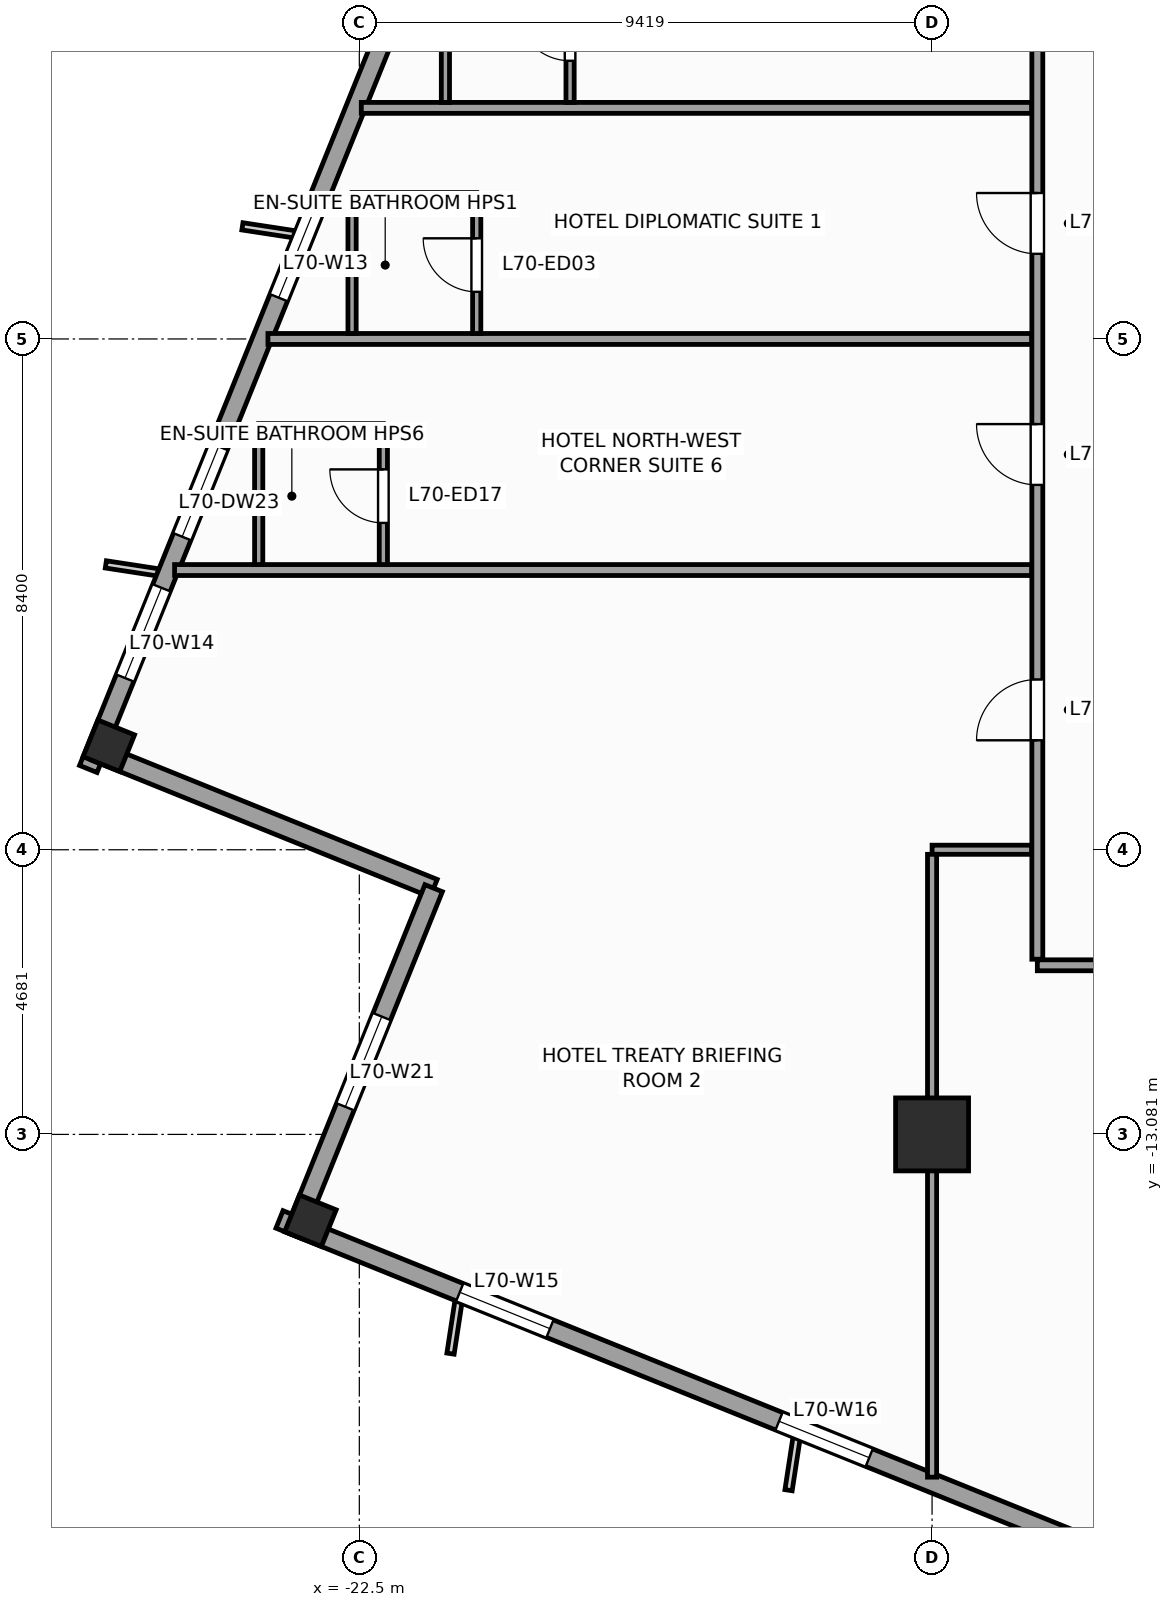
"""IFC4 building model, lengths in metres.
Left out: names, types, materials, properties, quantities, classifications, styles, units other than length and angle.
Written with IfcOpenShell. Run it as: python <this file> out.ifc"""

import sys

from ifc_helpers import new_model, si_unit, direction, frame, frame_2d, origin, origin_2d, place, context, subcontext, project, spatial, rectangle, extrude, source, transform, mapped, element, fill, save


model = new_model("IFC4")
c1 = context("Model", 3, precision=1e-05, world=origin(), true_north=direction((0.0, 1.0)))
c2 = subcontext(c1, "Body", "Model", "MODEL_VIEW")
j1 = project(units=[si_unit("LENGTHUNIT", "METRE"), si_unit("PLANEANGLEUNIT", "RADIAN")], contexts=[c1])
p1 = place(None, origin())
s1 = spatial("IfcSite", under=j1, at=p1, CompositionType="ELEMENT")
p2 = place(p1, origin())
s2 = spatial("IfcBuilding", under=s1, at=p2, CompositionType="ELEMENT")
p3 = place(p2, frame((0.0, 0.0, 286.8)))
s3 = spatial("IfcBuildingStorey", under=s2, at=p3, CompositionType="ELEMENT", Elevation=286.8)
m1 = source(origin(), c2, "Body", "SweptSolid", [
    extrude(rectangle(XDim=1.2, YDim=1.2, at=origin_2d()), origin(), (0.0, 0.0, 1.0), 3.6),
])
p4 = place(p3, frame((-13.081, -13.081, 0.0), z_axis=(0.0, 0.0, 1.0), x_axis=(1.0, 0.0, 0.0)))
e1 = element("IfcColumn", 1, at=p4, inside=s3, PredefinedType="COLUMN", context=c2, shape_type="MappedRepresentation", body=[
    mapped(m1, transform((0.0, 0.0, 0.0), scale=1.0)),
])
m2 = source(origin(), c2, "Body", "SweptSolid", [
    extrude(rectangle(XDim=0.65, YDim=0.65, at=origin_2d()), origin(), (0.0, 0.0, 1.0), 3.6),
])
for number, where, z_axis, x_axis in (
    (2, (-26.62, -6.69, 0.0), (0.0, 0.0, 1.0), (0.375, 0.927, 0.0)),
    (3, (-23.304, -14.501, 0.0), (0.0, 0.0, 1.0), (0.375, 0.927, 0.0)),
):
    element("IfcColumn", number, at=place(p3, frame(where, z_axis=z_axis, x_axis=x_axis)), inside=s3, PredefinedType="COLUMN", context=c2, shape_type="MappedRepresentation", body=[
        mapped(m2, transform((0.0, 0.0, 0.0), scale=1.0)),
    ])
p5 = place(p3, frame((-14.479, 23.813, 0.0), z_axis=(0.0, 0.0, 1.0), x_axis=(-0.374609557019, -0.927182657188, 0.0)))
e4 = element("IfcWall", 4, at=p5, inside=s3, PredefinedType="STANDARD", context=c2, shape_type="SweptSolid", body=[
    extrude(rectangle(XDim=33.31, YDim=0.31, at=frame_2d((16.655, 0.0))), origin(), (0.0, 0.0, 1.0), 2.75),
])
p6 = place(p5, frame((3.197, 0.0, 0.47)))
e5 = element("IfcOpeningElement", 5, at=p6, cuts=e4, PredefinedType="OPENING", context=c2, shape_type="SweptSolid", body=[
    extrude(rectangle(XDim=1.6, YDim=2.1, at=frame_2d((0.8, 1.05))), frame((0.0, 0.165, 0.0), z_axis=(0.0, -1.0, 0.0), x_axis=(1.0, 0.0, 0.0)), (0.0, 0.0, 1.0), 0.33),
])
p7 = place(p5, frame((8.86, 0.0, 0.47)))
e6 = element("IfcOpeningElement", 6, at=p7, cuts=e4, PredefinedType="OPENING", context=c2, shape_type="SweptSolid", body=[
    extrude(rectangle(XDim=1.6, YDim=2.1, at=frame_2d((0.8, 1.05))), frame((0.0, 0.165, 0.0), z_axis=(0.0, -1.0, 0.0), x_axis=(1.0, 0.0, 0.0)), (0.0, 0.0, 1.0), 0.33),
])
p8 = place(p5, frame((14.439, 0.0, 0.47)))
e7 = element("IfcOpeningElement", 7, at=p8, cuts=e4, PredefinedType="OPENING", context=c2, shape_type="SweptSolid", body=[
    extrude(rectangle(XDim=1.6, YDim=2.1, at=frame_2d((0.8, 1.05))), frame((0.0, 0.165, 0.0), z_axis=(0.0, -1.0, 0.0), x_axis=(1.0, 0.0, 0.0)), (0.0, 0.0, 1.0), 0.33),
])
p9 = place(p5, frame((23.351, 0.0, 0.47)))
e8 = element("IfcOpeningElement", 8, at=p9, cuts=e4, PredefinedType="OPENING", context=c2, shape_type="SweptSolid", body=[
    extrude(rectangle(XDim=1.6, YDim=2.1, at=frame_2d((0.8, 1.05))), frame((0.0, 0.165, 0.0), z_axis=(0.0, -1.0, 0.0), x_axis=(1.0, 0.0, 0.0)), (0.0, 0.0, 1.0), 0.33),
])
p10 = place(p5, frame((30.097, 0.0, 0.47)))
e9 = element("IfcOpeningElement", 9, at=p10, cuts=e4, PredefinedType="OPENING", context=c2, shape_type="SweptSolid", body=[
    extrude(rectangle(XDim=1.6, YDim=2.1, at=frame_2d((0.8, 1.05))), frame((0.0, 0.165, 0.0), z_axis=(0.0, -1.0, 0.0), x_axis=(1.0, 0.0, 0.0)), (0.0, 0.0, 1.0), 0.33),
])
p11 = place(p5, frame((27.59, 0.0, 0.47)))
e10 = element("IfcOpeningElement", 10, at=p11, cuts=e4, PredefinedType="OPENING", context=c2, shape_type="SweptSolid", body=[
    extrude(rectangle(XDim=1.6, YDim=2.1, at=frame_2d((0.8, 1.05))), frame((0.0, 0.165, 0.0), z_axis=(0.0, -1.0, 0.0), x_axis=(1.0, 0.0, 0.0)), (0.0, 0.0, 1.0), 0.33),
])
p12 = place(p3, frame((-26.841, -6.784, 0.0), z_axis=(0.0, 0.0, 1.0), x_axis=(0.927171722085, -0.374636620962, 0.0)))
e11 = element("IfcWall", 11, at=p12, inside=s3, PredefinedType="STANDARD", context=c2, shape_type="SweptSolid", body=[
    extrude(rectangle(XDim=6.0, YDim=0.31, at=frame_2d((3.0, 0.0))), origin(), (0.0, 0.0, 1.0), 2.65),
])
p13 = place(p3, frame((-21.278, -9.032, 0.0), z_axis=(0.0, 0.0, 1.0), x_axis=(-0.374602739196, -0.927185411764, 0.0)))
e12 = element("IfcWall", 12, at=p13, inside=s3, PredefinedType="STANDARD", context=c2, shape_type="SweptSolid", body=[
    extrude(rectangle(XDim=6.155, YDim=0.31, at=frame_2d((3.078, 0.0))), origin(), (0.0, 0.0, 1.0), 3.35),
])
p14 = place(p13, frame((2.278, 0.0, 0.47)))
e13 = element("IfcOpeningElement", 13, at=p14, cuts=e12, PredefinedType="OPENING", context=c2, shape_type="SweptSolid", body=[
    extrude(rectangle(XDim=1.6, YDim=2.1, at=frame_2d((0.8, 1.05))), frame((0.0, 0.165, 0.0), z_axis=(0.0, -1.0, 0.0), x_axis=(1.0, 0.0, 0.0)), (0.0, 0.0, 1.0), 0.33),
])
p15 = place(p3, frame((-23.813, -14.479, 0.0), z_axis=(0.0, 0.0, 1.0), x_axis=(0.927182657188, -0.374609557019, 0.0)))
e14 = element("IfcWall", 14, at=p15, inside=s3, PredefinedType="STANDARD", context=c2, shape_type="SweptSolid", body=[
    extrude(rectangle(XDim=33.31, YDim=0.31, at=frame_2d((16.655, 0.0))), origin(), (0.0, 0.0, 1.0), 2.75),
])
p16 = place(p15, frame((21.73, 0.0, 0.0)))
e15 = element("IfcOpeningElement", 15, at=p16, cuts=e14, PredefinedType="OPENING", context=c2, shape_type="SweptSolid", body=[
    extrude(rectangle(XDim=1.05, YDim=2.25, at=frame_2d((0.525, 1.125))), frame((0.0, 0.165, 0.0), z_axis=(0.0, -1.0, 0.0), x_axis=(1.0, 0.0, 0.0)), (0.0, 0.0, 1.0), 0.33),
])
p17 = place(p15, frame((3.197, 0.0, 0.47)))
e16 = element("IfcOpeningElement", 16, at=p17, cuts=e14, PredefinedType="OPENING", context=c2, shape_type="SweptSolid", body=[
    extrude(rectangle(XDim=1.6, YDim=2.1, at=frame_2d((0.8, 1.05))), frame((0.0, 0.165, 0.0), z_axis=(0.0, -1.0, 0.0), x_axis=(1.0, 0.0, 0.0)), (0.0, 0.0, 1.0), 0.33),
])
p18 = place(p15, frame((8.86, 0.0, 0.47)))
e17 = element("IfcOpeningElement", 17, at=p18, cuts=e14, PredefinedType="OPENING", context=c2, shape_type="SweptSolid", body=[
    extrude(rectangle(XDim=1.6, YDim=2.1, at=frame_2d((0.8, 1.05))), frame((0.0, 0.165, 0.0), z_axis=(0.0, -1.0, 0.0), x_axis=(1.0, 0.0, 0.0)), (0.0, 0.0, 1.0), 0.33),
])
p19 = place(p15, frame((14.439, 0.0, 0.47)))
e18 = element("IfcOpeningElement", 18, at=p19, cuts=e14, PredefinedType="OPENING", context=c2, shape_type="SweptSolid", body=[
    extrude(rectangle(XDim=1.6, YDim=2.1, at=frame_2d((0.8, 1.05))), frame((0.0, 0.165, 0.0), z_axis=(0.0, -1.0, 0.0), x_axis=(1.0, 0.0, 0.0)), (0.0, 0.0, 1.0), 0.33),
])
p20 = place(p15, frame((27.847, 0.0, 0.47)))
e19 = element("IfcOpeningElement", 19, at=p20, cuts=e14, PredefinedType="OPENING", context=c2, shape_type="SweptSolid", body=[
    extrude(rectangle(XDim=1.6, YDim=2.1, at=frame_2d((0.8, 1.05))), frame((0.0, 0.165, 0.0), z_axis=(0.0, -1.0, 0.0), x_axis=(1.0, 0.0, 0.0)), (0.0, 0.0, 1.0), 0.33),
])
p21 = place(p3, frame((-11.35, -10.3, 0.0), z_axis=(0.0, 0.0, 1.0), x_axis=(1.0, 0.0, 0.0)))
e20 = element("IfcWall", 20, at=p21, inside=s3, PredefinedType="PARTITIONING", context=c2, shape_type="SweptSolid", body=[
    extrude(rectangle(XDim=22.8, YDim=0.18, at=frame_2d((11.4, 0.0))), origin(), (0.0, 0.0, 1.0), 3.35),
])
p22 = place(p21, frame((12.336, 0.0, 0.0)))
e21 = element("IfcOpeningElement", 21, at=p22, cuts=e20, PredefinedType="OPENING", context=c2, shape_type="SweptSolid", body=[
    extrude(rectangle(XDim=0.95, YDim=2.1, at=frame_2d((0.475, 1.05))), frame((0.0, 0.1, 0.0), z_axis=(0.0, -1.0, 0.0), x_axis=(1.0, 0.0, 0.0)), (0.0, 0.0, 1.0), 0.2),
])
p23 = place(p21, frame((17.71, 0.0, 0.0)))
e22 = element("IfcOpeningElement", 22, at=p23, cuts=e20, PredefinedType="OPENING", context=c2, shape_type="SweptSolid", body=[
    extrude(rectangle(XDim=1.0, YDim=2.15, at=frame_2d((0.5, 1.075))), frame((0.0, 0.1, 0.0), z_axis=(0.0, -1.0, 0.0), x_axis=(1.0, 0.0, 0.0)), (0.0, 0.0, 1.0), 0.2),
])
p24 = place(p21, frame((5.339, 0.0, 0.0)))
e23 = element("IfcOpeningElement", 23, at=p24, cuts=e20, PredefinedType="OPENING", context=c2, shape_type="SweptSolid", body=[
    extrude(rectangle(XDim=1.0, YDim=2.15, at=frame_2d((0.5, 1.075))), frame((0.0, 0.1, 0.0), z_axis=(0.0, -1.0, 0.0), x_axis=(1.0, 0.0, 0.0)), (0.0, 0.0, 1.0), 0.2),
])
p25 = place(p3, frame((-11.35, -10.2, 0.0), z_axis=(0.0, 0.0, 1.0), x_axis=(0.0, 1.0, 0.0)))
e24 = element("IfcWall", 24, at=p25, inside=s3, PredefinedType="PARTITIONING", context=c2, shape_type="SweptSolid", body=[
    extrude(rectangle(XDim=22.55, YDim=0.18, at=frame_2d((11.275, 0.0))), origin(), (0.0, 0.0, 1.0), 3.35),
])
p26 = place(p25, frame((11.6, 0.0, 0.0)))
e25 = element("IfcOpeningElement", 25, at=p26, cuts=e24, PredefinedType="OPENING", context=c2, shape_type="SweptSolid", body=[
    extrude(rectangle(XDim=1.0, YDim=2.15, at=frame_2d((0.5, 1.075))), frame((0.0, 0.1, 0.0), z_axis=(0.0, -1.0, 0.0), x_axis=(1.0, 0.0, 0.0)), (0.0, 0.0, 1.0), 0.2),
])
p27 = place(p25, frame((15.8, 0.0, 0.0)))
e26 = element("IfcOpeningElement", 26, at=p27, cuts=e24, PredefinedType="OPENING", context=c2, shape_type="SweptSolid", body=[
    extrude(rectangle(XDim=1.0, YDim=2.15, at=frame_2d((0.5, 1.075))), frame((0.0, 0.1, 0.0), z_axis=(0.0, -1.0, 0.0), x_axis=(1.0, 0.0, 0.0)), (0.0, 0.0, 1.0), 0.2),
])
p28 = place(p25, frame((3.6, 0.0, 0.0)))
e27 = element("IfcOpeningElement", 27, at=p28, cuts=e24, PredefinedType="OPENING", context=c2, shape_type="SweptSolid", body=[
    extrude(rectangle(XDim=1.0, YDim=2.15, at=frame_2d((0.5, 1.075))), frame((0.0, 0.1, 0.0), z_axis=(0.0, -1.0, 0.0), x_axis=(1.0, 0.0, 0.0)), (0.0, 0.0, 1.0), 0.2),
])
p29 = place(p25, frame((7.8, 0.0, 0.0)))
e28 = element("IfcOpeningElement", 28, at=p29, cuts=e24, PredefinedType="OPENING", context=c2, shape_type="SweptSolid", body=[
    extrude(rectangle(XDim=1.0, YDim=2.15, at=frame_2d((0.5, 1.075))), frame((0.0, 0.1, 0.0), z_axis=(0.0, -1.0, 0.0), x_axis=(1.0, 0.0, 0.0)), (0.0, 0.0, 1.0), 0.2),
])
p30 = place(p3, frame((-11.445, -3.8, 0.0), z_axis=(0.0, 0.0, 1.0), x_axis=(-1.0, 0.0, 0.0)))
e29 = element("IfcWall", 29, at=p30, inside=s3, PredefinedType="PARTITIONING", context=c2, shape_type="SweptSolid", body=[
    extrude(rectangle(XDim=14.093, YDim=0.18, at=frame_2d((7.046, 0.0))), origin(), (0.0, 0.0, 1.0), 3.35),
])
p31 = place(p3, frame((-11.445, 0.0, 0.0), z_axis=(0.0, 0.0, 1.0), x_axis=(-1.0, 0.0, 0.0)))
e30 = element("IfcWall", 30, at=p31, inside=s3, PredefinedType="PARTITIONING", context=c2, shape_type="SweptSolid", body=[
    extrude(rectangle(XDim=12.558, YDim=0.18, at=frame_2d((6.279, 0.0))), origin(), (0.0, 0.0, 1.0), 3.02),
])
p32 = place(p3, frame((-11.445, 3.8, 0.0), z_axis=(0.0, 0.0, 1.0), x_axis=(-1.0, 0.0, 0.0)))
e31 = element("IfcWall", 31, at=p32, inside=s3, PredefinedType="PARTITIONING", context=c2, shape_type="SweptSolid", body=[
    extrude(rectangle(XDim=11.022, YDim=0.18, at=frame_2d((5.511, 0.0))), origin(), (0.0, 0.0, 1.0), 3.02),
])
p33 = place(p3, frame((-11.445, -8.4, 0.0), z_axis=(0.0, 0.0, 1.0), x_axis=(-1.0, 0.0, 0.0)))
e32 = element("IfcWall", 32, at=p33, inside=s3, PredefinedType="PARTITIONING", context=c2, shape_type="SweptSolid", body=[
    extrude(rectangle(XDim=1.636, YDim=0.15, at=frame_2d((0.818, 0.0))), origin(), (0.0, 0.0, 1.0), 3.35),
])
p34 = place(p3, frame((-13.081, -8.475, 0.0), z_axis=(0.0, 0.0, 1.0), x_axis=(0.0, -1.0, 0.0)))
e33 = element("IfcWall", 33, at=p34, inside=s3, PredefinedType="PARTITIONING", context=c2, shape_type="SweptSolid", body=[
    extrude(rectangle(XDim=10.243, YDim=0.15, at=frame_2d((5.121, 0.0))), origin(), (0.0, 0.0, 1.0), 2.45),
])
p35 = place(p3, frame((-20.57, 0.09, 0.0), z_axis=(0.0, 0.0, 1.0), x_axis=(0.0, 1.0, 0.0)))
e34 = element("IfcWall", 34, at=p35, inside=s3, PredefinedType="PARTITIONING", context=c2, shape_type="SweptSolid", body=[
    extrude(rectangle(XDim=2.25, YDim=0.135, at=frame_2d((1.125, 0.0))), origin(), (0.0, 0.0, 1.0), 3.35),
])
p36 = place(p35, frame((0.685, 0.0, 0.0)))
e35 = element("IfcOpeningElement", 35, at=p36, cuts=e34, PredefinedType="OPENING", context=c2, shape_type="SweptSolid", body=[
    extrude(rectangle(XDim=0.88, YDim=2.1, at=frame_2d((0.44, 1.05))), frame((0.0, 0.078, 0.0), z_axis=(0.0, -1.0, 0.0), x_axis=(1.0, 0.0, 0.0)), (0.0, 0.0, 1.0), 0.155),
])
p37 = place(p3, frame((-22.619, 2.34, 0.0), z_axis=(0.0, 0.0, 1.0), x_axis=(1.0, 0.0, 0.0)))
e36 = element("IfcWall", 36, at=p37, inside=s3, PredefinedType="PARTITIONING", context=c2, shape_type="SweptSolid", body=[
    extrude(rectangle(XDim=2.05, YDim=0.135, at=frame_2d((1.025, 0.0))), origin(), (0.0, 0.0, 1.0), 3.35),
])
p38 = place(p3, frame((-22.619, 0.09, 0.0), z_axis=(0.0, 0.0, 1.0), x_axis=(0.0, 1.0, 0.0)))
e37 = element("IfcWall", 37, at=p38, inside=s3, PredefinedType="PARTITIONING", context=c2, shape_type="SweptSolid", body=[
    extrude(rectangle(XDim=2.25, YDim=0.135, at=frame_2d((1.125, 0.0))), origin(), (0.0, 0.0, 1.0), 3.35),
])
p39 = place(p3, frame((-19.034, 3.89, 0.0), z_axis=(0.0, 0.0, 1.0), x_axis=(0.0, 1.0, 0.0)))
e38 = element("IfcWall", 38, at=p39, inside=s3, PredefinedType="PARTITIONING", context=c2, shape_type="SweptSolid", body=[
    extrude(rectangle(XDim=2.25, YDim=0.135, at=frame_2d((1.125, 0.0))), origin(), (0.0, 0.0, 1.0), 3.35),
])
p40 = place(p39, frame((0.685, 0.0, 0.0)))
e39 = element("IfcOpeningElement", 39, at=p40, cuts=e38, PredefinedType="OPENING", context=c2, shape_type="SweptSolid", body=[
    extrude(rectangle(XDim=0.88, YDim=2.1, at=frame_2d((0.44, 1.05))), frame((0.0, 0.078, 0.0), z_axis=(0.0, -1.0, 0.0), x_axis=(1.0, 0.0, 0.0)), (0.0, 0.0, 1.0), 0.155),
])
p41 = place(p3, frame((-21.084, 3.89, 0.0), z_axis=(0.0, 0.0, 1.0), x_axis=(0.0, 1.0, 0.0)))
e40 = element("IfcWall", 40, at=p41, inside=s3, PredefinedType="PARTITIONING", context=c2, shape_type="SweptSolid", body=[
    extrude(rectangle(XDim=2.25, YDim=0.135, at=frame_2d((1.125, 0.0))), origin(), (0.0, 0.0, 1.0), 3.35),
])
p42 = place(p3, frame((-22.105, -3.71, 0.0), z_axis=(0.0, 0.0, 1.0), x_axis=(0.0, 1.0, 0.0)))
e41 = element("IfcWall", 41, at=p42, inside=s3, PredefinedType="PARTITIONING", context=c2, shape_type="SweptSolid", body=[
    extrude(rectangle(XDim=2.25, YDim=0.135, at=frame_2d((1.125, 0.0))), origin(), (0.0, 0.0, 1.0), 3.35),
])
p43 = place(p42, frame((0.685, 0.0, 0.0)))
e42 = element("IfcOpeningElement", 42, at=p43, cuts=e41, PredefinedType="OPENING", context=c2, shape_type="SweptSolid", body=[
    extrude(rectangle(XDim=0.88, YDim=2.1, at=frame_2d((0.44, 1.05))), frame((0.0, 0.078, 0.0), z_axis=(0.0, -1.0, 0.0), x_axis=(1.0, 0.0, 0.0)), (0.0, 0.0, 1.0), 0.155),
])
p44 = place(p3, frame((-24.155, -1.46, 0.0), z_axis=(0.0, 0.0, 1.0), x_axis=(1.0, 0.0, 0.0)))
e43 = element("IfcWall", 43, at=p44, inside=s3, PredefinedType="PARTITIONING", context=c2, shape_type="SweptSolid", body=[
    extrude(rectangle(XDim=2.05, YDim=0.135, at=frame_2d((1.025, 0.0))), origin(), (0.0, 0.0, 1.0), 3.35),
])
p45 = place(p3, frame((-24.155, -3.71, 0.0), z_axis=(0.0, 0.0, 1.0), x_axis=(0.0, 1.0, 0.0)))
e44 = element("IfcWall", 44, at=p45, inside=s3, PredefinedType="PARTITIONING", context=c2, shape_type="SweptSolid", body=[
    extrude(rectangle(XDim=2.25, YDim=0.135, at=frame_2d((1.125, 0.0))), origin(), (0.0, 0.0, 1.0), 3.35),
])
m3 = source(origin(), c2, "Body", "SweptSolid", [
    extrude(rectangle(XDim=1.6, YDim=2.1, at=frame_2d((0.8, 1.05))), frame((0.0, 0.03, 0.0), z_axis=(0.0, -1.0, 0.0), x_axis=(1.0, 0.0, 0.0)), (0.0, 0.0, 1.0), 0.06),
])
p46 = place(p9, origin())
e45 = element("IfcWindow", 45, at=p46, inside=s3, PartitioningType="SINGLE_PANEL", PredefinedType="WINDOW", context=c2, shape_type="MappedRepresentation", body=[
    mapped(m3, transform((0.0, 0.0, 0.0), scale=1.0)),
])
fill(e8, e45)
p47 = place(p10, origin())
e46 = element("IfcWindow", 46, at=p47, inside=s3, PartitioningType="SINGLE_PANEL", PredefinedType="WINDOW", context=c2, shape_type="MappedRepresentation", body=[
    mapped(m3, transform((0.0, 0.0, 0.0), scale=1.0)),
])
fill(e9, e46)
p48 = place(p17, origin())
e47 = element("IfcWindow", 47, at=p48, inside=s3, PartitioningType="SINGLE_PANEL", PredefinedType="WINDOW", context=c2, shape_type="MappedRepresentation", body=[
    mapped(m3, transform((0.0, 0.0, 0.0), scale=1.0)),
])
fill(e16, e47)
p49 = place(p18, origin())
e48 = element("IfcWindow", 48, at=p49, inside=s3, PartitioningType="SINGLE_PANEL", PredefinedType="WINDOW", context=c2, shape_type="MappedRepresentation", body=[
    mapped(m3, transform((0.0, 0.0, 0.0), scale=1.0)),
])
fill(e17, e48)
p50 = place(p14, origin())
e49 = element("IfcWindow", 49, at=p50, inside=s3, PartitioningType="SINGLE_PANEL", PredefinedType="WINDOW", context=c2, shape_type="MappedRepresentation", body=[
    mapped(m3, transform((0.0, 0.0, 0.0), scale=1.0)),
])
fill(e13, e49)
m4 = source(origin(), c2, "Body", "SweptSolid", [
    extrude(rectangle(XDim=1.0, YDim=2.15, at=frame_2d((0.5, 1.075))), frame((0.0, 0.025, 0.0), z_axis=(0.0, -1.0, 0.0), x_axis=(1.0, 0.0, 0.0)), (0.0, 0.0, 1.0), 0.05),
])
p51 = place(p26, origin())
e50 = element("IfcDoor", 50, at=p51, inside=s3, OperationType="SINGLE_SWING_RIGHT", PredefinedType="DOOR", context=c2, shape_type="MappedRepresentation", body=[
    mapped(m4, transform((0.0, 0.0, 0.0), scale=1.0)),
])
fill(e25, e50)
m5 = source(origin(), c2, "Body", "SweptSolid", [
    extrude(rectangle(XDim=0.88, YDim=2.1, at=frame_2d((0.44, 1.05))), frame((0.0, 0.025, 0.0), z_axis=(0.0, -1.0, 0.0), x_axis=(1.0, 0.0, 0.0)), (0.0, 0.0, 1.0), 0.05),
])
p52 = place(p36, origin())
e51 = element("IfcDoor", 51, at=p52, inside=s3, OperationType="SINGLE_SWING_RIGHT", PredefinedType="DOOR", context=c2, shape_type="MappedRepresentation", body=[
    mapped(m5, transform((0.0, 0.0, 0.0), scale=1.0)),
])
fill(e35, e51)
p53 = place(p40, origin())
e52 = element("IfcDoor", 52, at=p53, inside=s3, OperationType="SINGLE_SWING_RIGHT", PredefinedType="DOOR", context=c2, shape_type="MappedRepresentation", body=[
    mapped(m5, transform((0.0, 0.0, 0.0), scale=1.0)),
])
fill(e39, e52)
p54 = place(p28, origin())
e53 = element("IfcDoor", 53, at=p54, inside=s3, OperationType="SINGLE_SWING_LEFT", PredefinedType="DOOR", context=c2, shape_type="MappedRepresentation", body=[
    mapped(m4, transform((0.0, 0.0, 0.0), scale=1.0)),
])
fill(e27, e53)
p55 = place(p29, origin())
e54 = element("IfcDoor", 54, at=p55, inside=s3, OperationType="SINGLE_SWING_RIGHT", PredefinedType="DOOR", context=c2, shape_type="MappedRepresentation", body=[
    mapped(m4, transform((0.0, 0.0, 0.0), scale=1.0)),
])
fill(e28, e54)
p56 = place(p43, origin())
e55 = element("IfcDoor", 55, at=p56, inside=s3, OperationType="SINGLE_SWING_RIGHT", PredefinedType="DOOR", context=c2, shape_type="MappedRepresentation", body=[
    mapped(m5, transform((0.0, 0.0, 0.0), scale=1.0)),
])
fill(e42, e55)
p57 = place(p11, origin())
e56 = element("IfcWindow", 56, at=p57, inside=s3, PartitioningType="SINGLE_PANEL", PredefinedType="WINDOW", context=c2, shape_type="MappedRepresentation", body=[
    mapped(m3, transform((0.0, 0.0, 0.0), scale=1.0)),
])
fill(e10, e56)
save(model, sys.argv[1])
